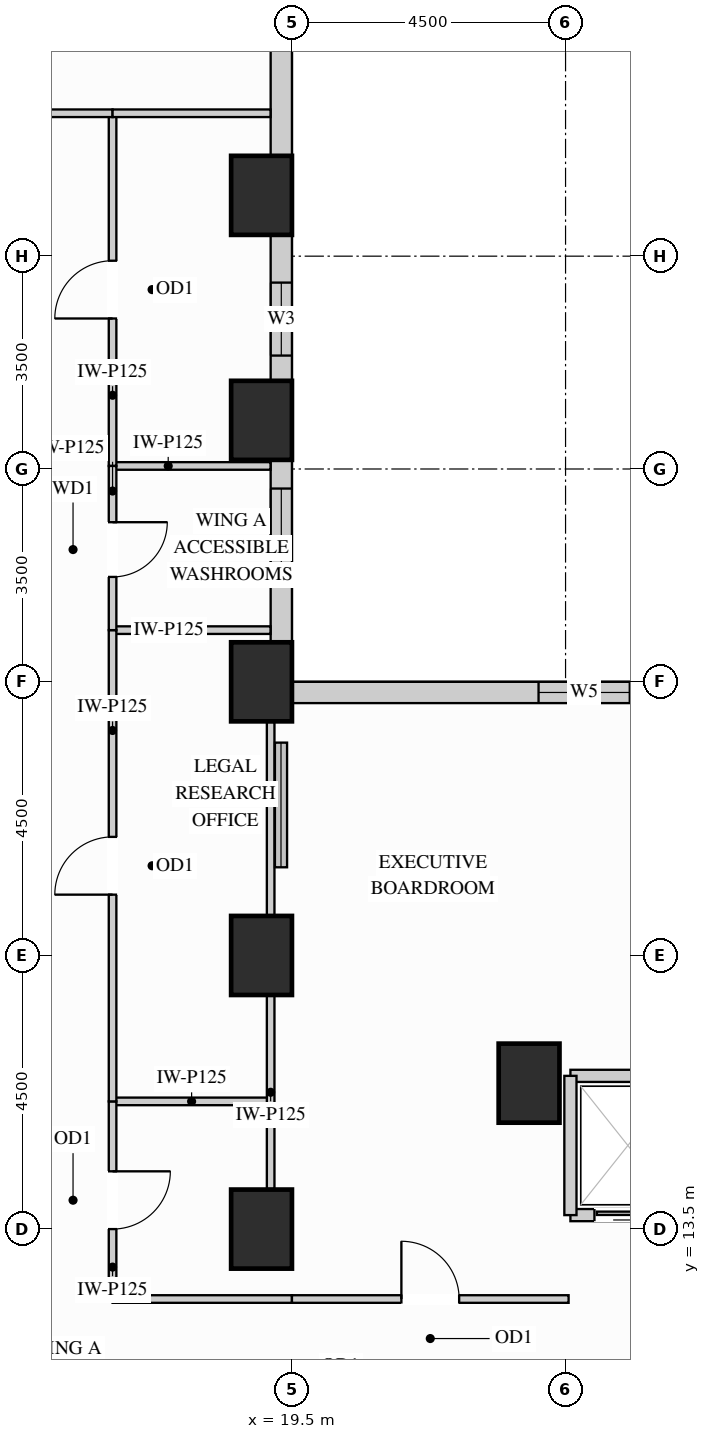
"""IFC4 building model, lengths in metres.
Left out: names, types, materials, properties, quantities, classifications, styles, units other than length and angle.
Written with IfcOpenShell. Run it as: python <this file> out.ifc"""

import sys

from ifc_helpers import new_model, si_unit, direction, frame, frame_2d, origin, origin_2d, place, context, subcontext, project, spatial, rectangle, extrude, source, transform, mapped, element, fill, save


model = new_model("IFC4")
c1 = context("Model", 3, precision=1e-05, world=origin(), true_north=direction((0.0, 1.0)))
c2 = subcontext(c1, "Body", "Model", "MODEL_VIEW")
j1 = project(units=[si_unit("LENGTHUNIT", "METRE"), si_unit("PLANEANGLEUNIT", "RADIAN")], contexts=[c1])
p1 = place(None, origin())
s1 = spatial("IfcSite", under=j1, at=p1, CompositionType="ELEMENT")
p2 = place(p1, origin())
s2 = spatial("IfcBuilding", under=s1, at=p2, CompositionType="ELEMENT")
p3 = place(p2, frame((0.0, 0.0, 51.3)))
s3 = spatial("IfcBuildingStorey", under=s2, at=p3, CompositionType="ELEMENT", Elevation=51.3)
m1 = source(origin(), c2, "Body", "SweptSolid", [
    extrude(rectangle(XDim=1.0, YDim=1.3, at=origin_2d()), origin(), (0.0, 0.0, 1.0), 3.38),
])
for number, where, z_axis, x_axis in (
    (1, (19.0, 13.5, 0.0), (0.0, 0.0, 1.0), (1.0, 0.0, 0.0)),
    (2, (19.0, 18.0, 0.0), (0.0, 0.0, 1.0), (1.0, 0.0, 0.0)),
    (3, (19.0, 22.5, 0.0), (0.0, 0.0, 1.0), (1.0, 0.0, 0.0)),
    (4, (19.0, 26.8, 0.0), (0.0, 0.0, 1.0), (1.0, 0.0, 0.0)),
    (5, (19.0, 30.5, 0.0), (0.0, 0.0, 1.0), (1.0, 0.0, 0.0)),
    (6, (23.4, 15.9, 0.0), (0.0, 0.0, 1.0), (1.0, 0.0, 0.0)),
):
    element("IfcColumn", number, at=place(p3, frame(where, z_axis=z_axis, x_axis=x_axis)), inside=s3, PredefinedType="COLUMN", context=c2, shape_type="MappedRepresentation", body=[
        mapped(m1, transform((0.0, 0.0, 0.0), x_axis=(1.0, 0.0, 0.0), y_axis=(0.0, 1.0, 0.0), z_axis=(0.0, 0.0, 1.0))),
    ])
p4 = place(p3, frame((34.352, 22.325, 0.0), z_axis=(0.0, 0.0, 1.0), x_axis=(-1.0, 0.0, 0.0)))
e7 = element("IfcWall", 7, at=p4, inside=s3, PredefinedType="SOLIDWALL", context=c2, shape_type="SweptSolid", body=[
    extrude(rectangle(XDim=14.854, YDim=0.35, at=frame_2d((7.427, 0.0))), origin(), (0.0, 0.0, 1.0), 3.365),
])
p5 = place(p4, frame((4.058, 0.0, 0.78)))
e8 = element("IfcOpeningElement", 8, at=p5, cuts=e7, PredefinedType="OPENING", context=c2, shape_type="SweptSolid", body=[
    extrude(rectangle(XDim=1.5, YDim=2.0, at=frame_2d((0.75, 1.0))), frame((0.0, 0.185, 0.0), z_axis=(0.0, -1.0, 0.0), x_axis=(1.0, 0.0, 0.0)), (0.0, 0.0, 1.0), 0.37),
])
p6 = place(p4, frame((9.296, 0.0, 0.78)))
e9 = element("IfcOpeningElement", 9, at=p6, cuts=e7, PredefinedType="OPENING", context=c2, shape_type="SweptSolid", body=[
    extrude(rectangle(XDim=1.5, YDim=2.0, at=frame_2d((0.75, 1.0))), frame((0.0, 0.185, 0.0), z_axis=(0.0, -1.0, 0.0), x_axis=(1.0, 0.0, 0.0)), (0.0, 0.0, 1.0), 0.37),
])
p7 = place(p3, frame((19.325, 23.148, 0.0), z_axis=(0.0, 0.0, 1.0), x_axis=(0.0, 1.0, 0.0)))
e10 = element("IfcWall", 10, at=p7, inside=s3, PredefinedType="SOLIDWALL", context=c2, shape_type="SweptSolid", body=[
    extrude(rectangle(XDim=3.004, YDim=0.35, at=frame_2d((1.502, 0.0))), origin(), (0.0, 0.0, 1.0), 2.51),
])
p8 = place(p7, frame((1.031, 0.0, 0.78)))
e11 = element("IfcOpeningElement", 11, at=p8, cuts=e10, PredefinedType="OPENING", context=c2, shape_type="SweptSolid", body=[
    extrude(rectangle(XDim=1.5, YDim=1.55, at=frame_2d((0.75, 0.775))), frame((0.0, 0.185, 0.0), z_axis=(0.0, -1.0, 0.0), x_axis=(1.0, 0.0, 0.0)), (0.0, 0.0, 1.0), 0.37),
])
p9 = place(p3, frame((19.325, 27.448, 0.0), z_axis=(0.0, 0.0, 1.0), x_axis=(0.0, 1.0, 0.0)))
e12 = element("IfcWall", 12, at=p9, inside=s3, PredefinedType="SOLIDWALL", context=c2, shape_type="SweptSolid", body=[
    extrude(rectangle(XDim=2.404, YDim=0.35, at=frame_2d((1.202, 0.0))), origin(), (0.0, 0.0, 1.0), 2.51),
])
p10 = place(p9, frame((0.417, 0.0, 0.78)))
e13 = element("IfcOpeningElement", 13, at=p10, cuts=e12, PredefinedType="OPENING", context=c2, shape_type="SweptSolid", body=[
    extrude(rectangle(XDim=1.2, YDim=1.55, at=frame_2d((0.6, 0.775))), frame((0.0, 0.185, 0.0), z_axis=(0.0, -1.0, 0.0), x_axis=(1.0, 0.0, 0.0)), (0.0, 0.0, 1.0), 0.37),
])
m2 = source(origin(), c2, "Body", "SweptSolid", [
    extrude(rectangle(XDim=3.204, YDim=0.35, at=frame_2d((1.602, 0.0))), origin(), (0.0, 0.0, 1.0), 2.51),
])
p11 = place(p3, frame((19.325, 31.148, 0.0), z_axis=(0.0, 0.0, 1.0), x_axis=(0.0, 1.0, 0.0)))
e14 = element("IfcWall", 14, at=p11, inside=s3, PredefinedType="SOLIDWALL", context=c2, shape_type="MappedRepresentation", body=[
    mapped(m2, transform((0.0, 0.0, 0.0), x_axis=(1.0, 0.0, 0.0), y_axis=(0.0, 1.0, 0.0), z_axis=(0.0, 0.0, 1.0))),
])
m3 = source(origin(), c2, "Body", "SweptSolid", [
    extrude(rectangle(XDim=2.6, YDim=0.125, at=frame_2d((1.3, 0.0))), origin(), (0.0, 0.0, 1.0), 3.365),
])
p12 = place(p3, frame((16.55, 15.6, 0.0), z_axis=(0.0, 0.0, 1.0), x_axis=(1.0, 0.0, 0.0)))
e15 = element("IfcWall", 15, at=p12, inside=s3, PredefinedType="PARTITIONING", context=c2, shape_type="MappedRepresentation", body=[
    mapped(m3, transform((0.0, 0.0, 0.0), x_axis=(1.0, 0.0, 0.0), y_axis=(0.0, 1.0, 0.0), z_axis=(0.0, 0.0, 1.0))),
])
m4 = source(origin(), c2, "Body", "SweptSolid", [
    extrude(rectangle(XDim=2.598, YDim=0.125, at=frame_2d((1.299, 0.0))), origin(), (0.0, 0.0, 1.0), 3.365),
])
for number, where, z_axis, x_axis in (
    (16, (16.55, 23.35, 0.0), (0.0, 0.0, 1.0), (1.0, 0.0, 0.0)),
    (17, (16.55, 26.05, 0.0), (0.0, 0.0, 1.0), (1.0, 0.0, 0.0)),
):
    element("IfcWall", number, at=place(p3, frame(where, z_axis=z_axis, x_axis=x_axis)), inside=s3, PredefinedType="PARTITIONING", context=c2, shape_type="MappedRepresentation", body=[
        mapped(m4, transform((0.0, 0.0, 0.0), x_axis=(1.0, 0.0, 0.0), y_axis=(0.0, 1.0, 0.0), z_axis=(0.0, 0.0, 1.0))),
    ])
m5 = source(origin(), c2, "Body", "SweptSolid", [
    extrude(rectangle(XDim=3.18, YDim=0.125, at=frame_2d((1.59, 0.0))), origin(), (0.0, 0.0, 1.0), 2.67),
])
for number, where, z_axis, x_axis in (
    (18, (19.15, 14.16, 0.0), (0.0, 0.0, 1.0), (0.0, 1.0, 0.0)),
    (19, (19.15, 18.66, 0.0), (0.0, 0.0, 1.0), (0.0, 1.0, 0.0)),
):
    element("IfcWall", number, at=place(p3, frame(where, z_axis=z_axis, x_axis=x_axis)), inside=s3, PredefinedType="PARTITIONING", context=c2, shape_type="MappedRepresentation", body=[
        mapped(m5, transform((0.0, 0.0, 0.0), x_axis=(1.0, 0.0, 0.0), y_axis=(0.0, 1.0, 0.0), z_axis=(0.0, 0.0, 1.0))),
    ])
p13 = place(p3, frame((16.55, 12.35, 0.0), z_axis=(0.0, 0.0, 1.0), x_axis=(0.0, 1.0, 0.0)))
e20 = element("IfcWall", 20, at=p13, inside=s3, PredefinedType="PARTITIONING", context=c2, shape_type="SweptSolid", body=[
    extrude(rectangle(XDim=3.25, YDim=0.125, at=frame_2d((1.625, 0.0))), origin(), (0.0, 0.0, 1.0), 3.365),
])
p14 = place(p13, frame((1.15, 0.0, 0.0)))
e21 = element("IfcOpeningElement", 21, at=p14, cuts=e20, PredefinedType="OPENING", context=c2, shape_type="SweptSolid", body=[
    extrude(rectangle(XDim=0.95, YDim=2.15, at=frame_2d((0.475, 1.075))), frame((0.0, 0.073, 0.0), z_axis=(0.0, -1.0, 0.0), x_axis=(1.0, 0.0, 0.0)), (0.0, 0.0, 1.0), 0.145),
])
p15 = place(p3, frame((16.55, 15.6, 0.0), z_axis=(0.0, 0.0, 1.0), x_axis=(0.0, 1.0, 0.0)))
e22 = element("IfcWall", 22, at=p15, inside=s3, PredefinedType="PARTITIONING", context=c2, shape_type="SweptSolid", body=[
    extrude(rectangle(XDim=7.75, YDim=0.125, at=frame_2d((3.875, 0.0))), origin(), (0.0, 0.0, 1.0), 3.365),
])
p16 = place(p15, frame((3.4, 0.0, 0.0)))
e23 = element("IfcOpeningElement", 23, at=p16, cuts=e22, PredefinedType="OPENING", context=c2, shape_type="SweptSolid", body=[
    extrude(rectangle(XDim=0.95, YDim=2.15, at=frame_2d((0.475, 1.075))), frame((0.0, 0.073, 0.0), z_axis=(0.0, -1.0, 0.0), x_axis=(1.0, 0.0, 0.0)), (0.0, 0.0, 1.0), 0.145),
])
p17 = place(p3, frame((16.55, 26.05, 0.0), z_axis=(0.0, 0.0, 1.0), x_axis=(0.0, 1.0, 0.0)))
e24 = element("IfcWall", 24, at=p17, inside=s3, PredefinedType="PARTITIONING", context=c2, shape_type="SweptSolid", body=[
    extrude(rectangle(XDim=5.8, YDim=0.125, at=frame_2d((2.9, 0.0))), origin(), (0.0, 0.0, 1.0), 3.365),
])
p18 = place(p17, frame((2.425, 0.0, 0.0)))
e25 = element("IfcOpeningElement", 25, at=p18, cuts=e24, PredefinedType="OPENING", context=c2, shape_type="SweptSolid", body=[
    extrude(rectangle(XDim=0.95, YDim=2.15, at=frame_2d((0.475, 1.075))), frame((0.0, 0.073, 0.0), z_axis=(0.0, -1.0, 0.0), x_axis=(1.0, 0.0, 0.0)), (0.0, 0.0, 1.0), 0.145),
])
p19 = place(p3, frame((16.55, 23.35, 0.0), z_axis=(0.0, 0.0, 1.0), x_axis=(0.0, 1.0, 0.0)))
e26 = element("IfcWall", 26, at=p19, inside=s3, PredefinedType="PARTITIONING", context=c2, shape_type="SweptSolid", body=[
    extrude(rectangle(XDim=2.7, YDim=0.125, at=frame_2d((1.35, 0.0))), origin(), (0.0, 0.0, 1.0), 3.365),
])
p20 = place(p19, frame((0.875, 0.0, 0.0)))
e27 = element("IfcOpeningElement", 27, at=p20, cuts=e26, PredefinedType="OPENING", context=c2, shape_type="SweptSolid", body=[
    extrude(rectangle(XDim=0.9, YDim=2.15, at=frame_2d((0.45, 1.075))), frame((0.0, 0.073, 0.0), z_axis=(0.0, -1.0, 0.0), x_axis=(1.0, 0.0, 0.0)), (0.0, 0.0, 1.0), 0.145),
])
p21 = place(p3, frame((2.45, 31.85, 0.0), z_axis=(0.0, 0.0, 1.0), x_axis=(1.0, 0.0, 0.0)))
e28 = element("IfcWall", 28, at=p21, inside=s3, PredefinedType="PARTITIONING", context=c2, shape_type="SweptSolid", body=[
    extrude(rectangle(XDim=14.1, YDim=0.125, at=frame_2d((7.05, 0.0))), origin(), (0.0, 0.0, 1.0), 2.828),
])
p22 = place(p21, frame((6.575, 0.0, 0.0)))
e29 = element("IfcOpeningElement", 29, at=p22, cuts=e28, PredefinedType="OPENING", context=c2, shape_type="SweptSolid", body=[
    extrude(rectangle(XDim=0.95, YDim=2.15, at=frame_2d((0.475, 1.075))), frame((0.0, 0.073, 0.0), z_axis=(0.0, -1.0, 0.0), x_axis=(1.0, 0.0, 0.0)), (0.0, 0.0, 1.0), 0.145),
])
m6 = source(origin(), c2, "Body", "SweptSolid", [
    extrude(rectangle(XDim=2.598, YDim=0.125, at=frame_2d((1.299, 0.0))), origin(), (0.0, 0.0, 1.0), 2.828),
])
p23 = place(p3, frame((16.55, 31.85, 0.0), z_axis=(0.0, 0.0, 1.0), x_axis=(1.0, 0.0, 0.0)))
e30 = element("IfcWall", 30, at=p23, inside=s3, PredefinedType="PARTITIONING", context=c2, shape_type="MappedRepresentation", body=[
    mapped(m6, transform((0.0, 0.0, 0.0), x_axis=(1.0, 0.0, 0.0), y_axis=(0.0, 1.0, 0.0), z_axis=(0.0, 0.0, 1.0))),
])
m7 = source(origin(), c2, "Body", "SweptSolid", [
    extrude(rectangle(XDim=2.95, YDim=0.125, at=frame_2d((1.475, 0.0))), origin(), (0.0, 0.0, 1.0), 3.365),
])
p24 = place(p3, frame((16.55, 12.35, 0.0), z_axis=(0.0, 0.0, 1.0), x_axis=(1.0, 0.0, 0.0)))
e31 = element("IfcWall", 31, at=p24, inside=s3, PredefinedType="PARTITIONING", context=c2, shape_type="MappedRepresentation", body=[
    mapped(m7, transform((0.0, 0.0, 0.0), x_axis=(1.0, 0.0, 0.0), y_axis=(0.0, 1.0, 0.0), z_axis=(0.0, 0.0, 1.0))),
])
p25 = place(p3, frame((19.5, 12.35, 0.0), z_axis=(0.0, 0.0, 1.0), x_axis=(1.0, 0.0, 0.0)))
e32 = element("IfcWall", 32, at=p25, inside=s3, PredefinedType="PARTITIONING", context=c2, shape_type="SweptSolid", body=[
    extrude(rectangle(XDim=4.55, YDim=0.125, at=frame_2d((2.275, 0.0))), origin(), (0.0, 0.0, 1.0), 3.365),
])
p26 = place(p25, frame((1.8, 0.0, 0.0)))
e33 = element("IfcOpeningElement", 33, at=p26, cuts=e32, PredefinedType="OPENING", context=c2, shape_type="SweptSolid", body=[
    extrude(rectangle(XDim=0.95, YDim=2.15, at=frame_2d((0.475, 1.075))), frame((0.0, 0.073, 0.0), z_axis=(0.0, -1.0, 0.0), x_axis=(1.0, 0.0, 0.0)), (0.0, 0.0, 1.0), 0.145),
])
m8 = source(origin(), c2, "Body", "SweptSolid", [
    extrude(rectangle(XDim=1.89, YDim=0.2, at=frame_2d((0.945, 0.0))), origin(), (0.0, 0.0, 1.0), 2.67),
])
p27 = place(p3, frame((24.08, 16.02, 0.0), z_axis=(0.0, 0.0, 1.0), x_axis=(1.0, 0.0, 0.0)))
e34 = element("IfcWall", 34, at=p27, inside=s3, PredefinedType="PARTITIONING", context=c2, shape_type="MappedRepresentation", body=[
    mapped(m8, transform((0.0, 0.0, 0.0), x_axis=(1.0, 0.0, 0.0), y_axis=(0.0, 1.0, 0.0), z_axis=(0.0, 0.0, 1.0))),
])
p28 = place(p3, frame((24.08, 13.73, 0.0), z_axis=(0.0, 0.0, 1.0), x_axis=(1.0, 0.0, 0.0)))
e35 = element("IfcWall", 35, at=p28, inside=s3, PredefinedType="PARTITIONING", context=c2, shape_type="SweptSolid", body=[
    extrude(rectangle(XDim=1.89, YDim=0.2, at=frame_2d((0.945, 0.0))), origin(), (0.0, 0.0, 1.0), 2.446),
])
p29 = place(p28, frame((0.395, 0.0, 0.0)))
e36 = element("IfcOpeningElement", 36, at=p29, cuts=e35, PredefinedType="OPENING", context=c2, shape_type="SweptSolid", body=[
    extrude(rectangle(XDim=1.1, YDim=2.2, at=frame_2d((0.55, 1.1))), frame((0.0, 0.11, 0.0), z_axis=(0.0, -1.0, 0.0), x_axis=(1.0, 0.0, 0.0)), (0.0, 0.0, 1.0), 0.22),
])
m9 = source(origin(), c2, "Body", "SweptSolid", [
    extrude(rectangle(XDim=2.29, YDim=0.2, at=frame_2d((1.145, 0.0))), origin(), (0.0, 0.0, 1.0), 3.365),
])
p30 = place(p3, frame((24.08, 13.73, 0.0), z_axis=(0.0, 0.0, 1.0), x_axis=(0.0, 1.0, 0.0)))
e37 = element("IfcWall", 37, at=p30, inside=s3, PredefinedType="PARTITIONING", context=c2, shape_type="MappedRepresentation", body=[
    mapped(m9, transform((0.0, 0.0, 0.0), x_axis=(1.0, 0.0, 0.0), y_axis=(0.0, 1.0, 0.0), z_axis=(0.0, 0.0, 1.0))),
])
m10 = source(origin(), c2, "Body", "SweptSolid", [
    extrude(rectangle(XDim=1.1, YDim=2.2, at=frame_2d((0.55, 1.1))), frame((0.0, 0.025, 0.0), z_axis=(0.0, -1.0, 0.0), x_axis=(1.0, 0.0, 0.0)), (0.0, 0.0, 1.0), 0.05),
])
p31 = place(p29, origin())
e38 = element("IfcDoor", 38, at=p31, inside=s3, OperationType="SLIDING_TO_LEFT", PredefinedType="DOOR", context=c2, shape_type="MappedRepresentation", body=[
    mapped(m10, transform((0.0, 0.0, 0.0), x_axis=(1.0, 0.0, 0.0), y_axis=(0.0, 1.0, 0.0), z_axis=(0.0, 0.0, 1.0))),
])
fill(e36, e38)
m11 = source(origin(), c2, "Body", "SweptSolid", [
    extrude(rectangle(XDim=0.95, YDim=2.15, at=frame_2d((0.475, 1.075))), frame((0.0, 0.025, 0.0), z_axis=(0.0, -1.0, 0.0), x_axis=(1.0, 0.0, 0.0)), (0.0, 0.0, 1.0), 0.05),
])
p32 = place(p14, origin())
e39 = element("IfcDoor", 39, at=p32, inside=s3, OperationType="SINGLE_SWING_RIGHT", PredefinedType="DOOR", context=c2, shape_type="MappedRepresentation", body=[
    mapped(m11, transform((0.0, 0.0, 0.0), x_axis=(1.0, 0.0, 0.0), y_axis=(0.0, 1.0, 0.0), z_axis=(0.0, 0.0, 1.0))),
])
fill(e21, e39)
p33 = place(p16, origin())
e40 = element("IfcDoor", 40, at=p33, inside=s3, OperationType="SINGLE_SWING_LEFT", PredefinedType="DOOR", context=c2, shape_type="MappedRepresentation", body=[
    mapped(m11, transform((0.0, 0.0, 0.0), x_axis=(1.0, 0.0, 0.0), y_axis=(0.0, 1.0, 0.0), z_axis=(0.0, 0.0, 1.0))),
])
fill(e23, e40)
p34 = place(p18, origin())
e41 = element("IfcDoor", 41, at=p34, inside=s3, OperationType="SINGLE_SWING_LEFT", PredefinedType="DOOR", context=c2, shape_type="MappedRepresentation", body=[
    mapped(m11, transform((0.0, 0.0, 0.0), x_axis=(1.0, 0.0, 0.0), y_axis=(0.0, 1.0, 0.0), z_axis=(0.0, 0.0, 1.0))),
])
fill(e25, e41)
p35 = place(p26, origin())
e42 = element("IfcDoor", 42, at=p35, inside=s3, OperationType="SINGLE_SWING_LEFT", PredefinedType="DOOR", context=c2, shape_type="MappedRepresentation", body=[
    mapped(m11, transform((0.0, 0.0, 0.0), x_axis=(1.0, 0.0, 0.0), y_axis=(0.0, 1.0, 0.0), z_axis=(0.0, 0.0, 1.0))),
])
fill(e33, e42)
m12 = source(origin(), c2, "Body", "SweptSolid", [
    extrude(rectangle(XDim=0.9, YDim=2.15, at=frame_2d((0.45, 1.075))), frame((0.0, 0.025, 0.0), z_axis=(0.0, -1.0, 0.0), x_axis=(1.0, 0.0, 0.0)), (0.0, 0.0, 1.0), 0.05),
])
p36 = place(p20, origin())
e43 = element("IfcDoor", 43, at=p36, inside=s3, OperationType="SINGLE_SWING_RIGHT", PredefinedType="DOOR", context=c2, shape_type="MappedRepresentation", body=[
    mapped(m12, transform((0.0, 0.0, 0.0), x_axis=(1.0, 0.0, 0.0), y_axis=(0.0, 1.0, 0.0), z_axis=(0.0, 0.0, 1.0))),
])
fill(e27, e43)
m13 = source(origin(), c2, "Body", "SweptSolid", [
    extrude(rectangle(XDim=1.2, YDim=1.55, at=frame_2d((0.6, 0.775))), frame((0.0, 0.03, 0.0), z_axis=(0.0, -1.0, 0.0), x_axis=(1.0, 0.0, 0.0)), (0.0, 0.0, 1.0), 0.06),
])
p37 = place(p10, origin())
e44 = element("IfcWindow", 44, at=p37, inside=s3, PartitioningType="SINGLE_PANEL", PredefinedType="WINDOW", context=c2, shape_type="MappedRepresentation", body=[
    mapped(m13, transform((0.0, 0.0, 0.0), x_axis=(1.0, 0.0, 0.0), y_axis=(0.0, 1.0, 0.0), z_axis=(0.0, 0.0, 1.0))),
])
fill(e13, e44)
m14 = source(origin(), c2, "Body", "SweptSolid", [
    extrude(rectangle(XDim=1.5, YDim=2.0, at=frame_2d((0.75, 1.0))), frame((0.0, 0.03, 0.0), z_axis=(0.0, -1.0, 0.0), x_axis=(1.0, 0.0, 0.0)), (0.0, 0.0, 1.0), 0.06),
])
p38 = place(p6, origin())
e45 = element("IfcWindow", 45, at=p38, inside=s3, PartitioningType="SINGLE_PANEL", PredefinedType="WINDOW", context=c2, shape_type="MappedRepresentation", body=[
    mapped(m14, transform((0.0, 0.0, 0.0), x_axis=(1.0, 0.0, 0.0), y_axis=(0.0, 1.0, 0.0), z_axis=(0.0, 0.0, 1.0))),
])
fill(e9, e45)
m15 = source(origin(), c2, "Body", "SweptSolid", [
    extrude(rectangle(XDim=1.5, YDim=1.55, at=frame_2d((0.75, 0.775))), frame((0.0, 0.03, 0.0), z_axis=(0.0, -1.0, 0.0), x_axis=(1.0, 0.0, 0.0)), (0.0, 0.0, 1.0), 0.06),
])
p39 = place(p8, origin())
e46 = element("IfcWindow", 46, at=p39, inside=s3, PartitioningType="SINGLE_PANEL", PredefinedType="WINDOW", context=c2, shape_type="MappedRepresentation", body=[
    mapped(m15, transform((0.0, 0.0, 0.0), x_axis=(1.0, 0.0, 0.0), y_axis=(0.0, 1.0, 0.0), z_axis=(0.0, 0.0, 1.0))),
])
fill(e11, e46)
save(model, sys.argv[1])
